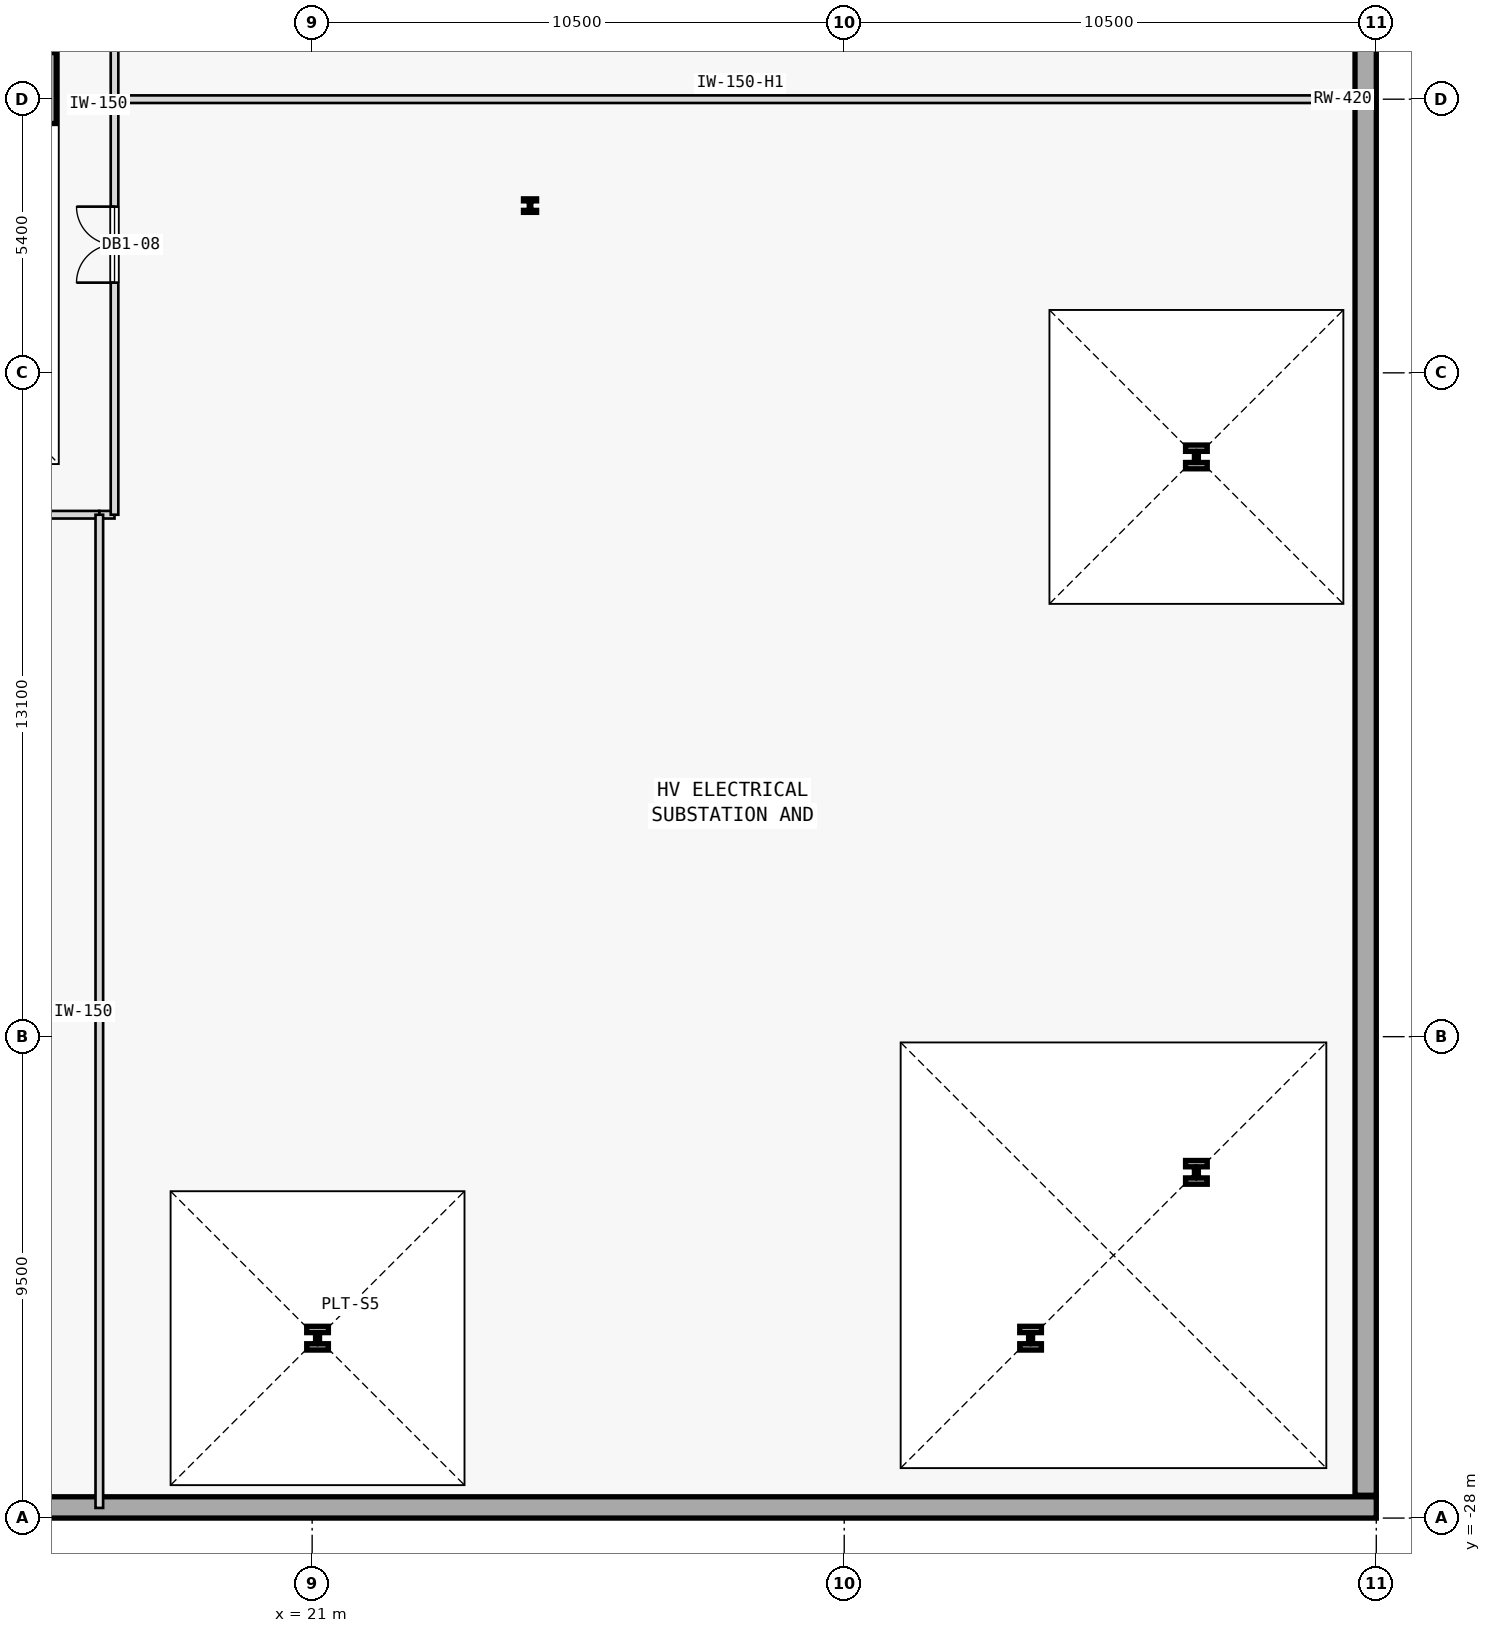
"""IFC4 building model, lengths in metres.
Left out: names, types, materials, properties, quantities, classifications, styles, units other than length and angle.
Written with IfcOpenShell. Run it as: python <this file> out.ifc"""

import sys

from ifc_helpers import new_model, si_unit, direction, frame, frame_2d, origin, origin_2d, place, context, subcontext, project, spatial, rectangle, i_section, extrude, element, fill, save


model = new_model("IFC4")
c1 = context("Model", 3, precision=1e-05, world=origin(), true_north=direction((0.0, 1.0)))
c2 = subcontext(c1, "Body", "Model", "MODEL_VIEW")
j1 = project(units=[si_unit("LENGTHUNIT", "METRE"), si_unit("PLANEANGLEUNIT", "RADIAN")], contexts=[c1])
p1 = place(None, origin())
s1 = spatial("IfcSite", under=j1, at=p1, CompositionType="ELEMENT")
p2 = place(p1, origin())
s2 = spatial("IfcBuilding", under=s1, at=p2, CompositionType="ELEMENT")
p3 = place(p2, frame((0.0, 0.0, -5.0)))
s3 = spatial("IfcBuildingStorey", under=s2, at=p3, CompositionType="ELEMENT", Elevation=-5.0)
p4 = place(p3, frame((-42.0, -27.79, 0.0), z_axis=(0.0, 0.0, 1.0), x_axis=(1.0, 0.0, 0.0)))
e1 = element("IfcWall", 1, at=p4, inside=s3, PredefinedType="SHEAR", context=c2, shape_type="SweptSolid", body=[
    extrude(rectangle(XDim=84.0, YDim=0.42, at=frame_2d((42.0, 0.0))), origin(), (0.0, 0.0, 1.0), 4.7),
])
p5 = place(p3, frame((41.79, -27.55, 0.0), z_axis=(0.0, 0.0, 1.0), x_axis=(0.0, 1.0, 0.0)))
e2 = element("IfcWall", 2, at=p5, inside=s3, PredefinedType="SHEAR", context=c2, shape_type="SweptSolid", body=[
    extrude(rectangle(XDim=55.1, YDim=0.42, at=frame_2d((27.55, 0.0))), origin(), (0.0, 0.0, 1.0), 4.7),
])
p6 = place(p3, frame((15.25, 0.22, 0.0), z_axis=(0.0, 0.0, 1.0), x_axis=(1.0, 0.0, 0.0)))
e3 = element("IfcColumn", 3, at=p6, inside=s3, PredefinedType="COLUMN", context=c2, shape_type="SweptSolid", body=[
    extrude(rectangle(XDim=1.4, YDim=1.4, at=origin_2d()), origin(), (0.0, 0.0, 1.0), 5.0),
])
for number, where, z_axis, x_axis in (
    (4, (21.107, -24.45, 0.0), (0.0, 0.0, 1.0), (1.0, 0.0, 0.0)),
    (5, (35.178, -24.45, 0.0), (0.0, 0.0, 1.0), (1.0, 0.0, 0.0)),
    (6, (38.45, -21.178, 0.0), (0.0, 0.0, 1.0), (1.0, 0.0, 0.0)),
    (7, (38.45, -7.059, 0.0), (0.0, 0.0, 1.0), (1.0, 0.0, 0.0)),
):
    element("IfcColumn", number, at=place(p3, frame(where, z_axis=z_axis, x_axis=x_axis)), inside=s3, PredefinedType="USERDEFINED", context=c2, shape_type="SweptSolid", body=[
        extrude(i_section(OverallWidth=0.428, OverallDepth=0.469, WebThickness=0.078, FlangeThickness=0.125, FilletRadius=0.015, at=origin_2d()), origin(), (0.0, 0.0, 1.0), 5.0),
    ])
p7 = place(p3, frame((25.3, -2.1, 0.0), z_axis=(0.0, 0.0, 1.0), x_axis=(1.0, 0.0, 0.0)))
e8 = element("IfcColumn", 8, at=p7, inside=s3, PredefinedType="COLUMN", context=c2, shape_type="SweptSolid", body=[
    extrude(i_section(OverallWidth=0.259, OverallDepth=0.267, WebThickness=0.013, FlangeThickness=0.021, FilletRadius=0.013, at=origin_2d()), origin(), (0.0, 0.0, 1.0), 5.0),
])
p8 = place(p3, frame((-17.1, -8.2, 0.0), z_axis=(0.0, 0.0, 1.0), x_axis=(1.0, 0.0, 0.0)))
e9 = element("IfcWall", 9, at=p8, inside=s3, PredefinedType="PARTITIONING", context=c2, shape_type="SweptSolid", body=[
    extrude(rectangle(XDim=33.9, YDim=0.15, at=frame_2d((16.95, 0.0))), origin(), (0.0, 0.0, 1.0), 4.7),
])
p9 = place(p8, frame((16.15, 0.0, 0.0)))
e10 = element("IfcOpeningElement", 10, at=p9, cuts=e9, PredefinedType="OPENING", context=c2, shape_type="SweptSolid", body=[
    extrude(rectangle(XDim=1.6, YDim=2.15, at=frame_2d((0.8, 1.075))), frame((0.0, 0.085, 0.0), z_axis=(0.0, -1.0, 0.0), x_axis=(1.0, 0.0, 0.0)), (0.0, 0.0, 1.0), 0.17),
])
p10 = place(p3, frame((16.8, -8.2, 0.0), z_axis=(0.0, 0.0, 1.0), x_axis=(1.0, 0.0, 0.0)))
e11 = element("IfcWall", 11, at=p10, inside=s3, PredefinedType="PARTITIONING", context=c2, shape_type="SweptSolid", body=[
    extrude(rectangle(XDim=0.3, YDim=0.15, at=frame_2d((0.15, 0.0))), origin(), (0.0, 0.0, 1.0), 4.7),
])
p11 = place(p3, frame((17.1, -8.2, 0.0), z_axis=(0.0, 0.0, 1.0), x_axis=(0.0, 1.0, 0.0)))
e12 = element("IfcWall", 12, at=p11, inside=s3, PredefinedType="PARTITIONING", context=c2, shape_type="SweptSolid", body=[
    extrude(rectangle(XDim=8.2, YDim=0.15, at=frame_2d((4.1, 0.0))), origin(), (0.0, 0.0, 1.0), 4.7),
])
p12 = place(p11, frame((4.58, 0.0, 0.0)))
e13 = element("IfcOpeningElement", 13, at=p12, cuts=e12, PredefinedType="OPENING", context=c2, shape_type="SweptSolid", body=[
    extrude(rectangle(XDim=1.5, YDim=2.15, at=frame_2d((0.75, 1.075))), frame((0.0, 0.085, 0.0), z_axis=(0.0, -1.0, 0.0), x_axis=(1.0, 0.0, 0.0)), (0.0, 0.0, 1.0), 0.17),
])
p13 = place(p3, frame((17.1, 0.0, 0.0), z_axis=(0.0, 0.0, 1.0), x_axis=(0.0, 1.0, 0.0)))
e14 = element("IfcWall", 14, at=p13, inside=s3, PredefinedType="PARTITIONING", context=c2, shape_type="SweptSolid", body=[
    extrude(rectangle(XDim=8.0, YDim=0.15, at=frame_2d((4.0, 0.0))), origin(), (0.0, 0.0, 1.0), 4.7),
])
p14 = place(p13, frame((2.225, 0.0, 0.0)))
e15 = element("IfcOpeningElement", 15, at=p14, cuts=e14, PredefinedType="OPENING", context=c2, shape_type="SweptSolid", body=[
    extrude(rectangle(XDim=1.15, YDim=2.15, at=frame_2d((0.575, 1.075))), frame((0.0, 0.085, 0.0), z_axis=(0.0, -1.0, 0.0), x_axis=(1.0, 0.0, 0.0)), (0.0, 0.0, 1.0), 0.17),
])
p15 = place(p3, frame((16.8, -27.8, 0.0), z_axis=(0.0, 0.0, 1.0), x_axis=(0.0, 1.0, 0.0)))
e16 = element("IfcWall", 16, at=p15, inside=s3, PredefinedType="PARTITIONING", context=c2, shape_type="SweptSolid", body=[
    extrude(rectangle(XDim=19.6, YDim=0.15, at=frame_2d((9.8, 0.0))), origin(), (0.0, 0.0, 1.0), 4.7),
])
p16 = place(p3, frame((17.1, 0.0, 0.0), z_axis=(0.0, 0.0, 1.0), x_axis=(1.0, 0.0, 0.0)))
e17 = element("IfcWall", 17, at=p16, inside=s3, PredefinedType="PARTITIONING", context=c2, shape_type="SweptSolid", body=[
    extrude(rectangle(XDim=24.7, YDim=0.15, at=frame_2d((12.35, 0.0))), origin(), (0.0, 0.0, 1.0), 4.25),
])
p17 = place(p12, origin())
e18 = element("IfcDoor", 18, at=p17, inside=s3, OperationType="DOUBLE_DOOR_SINGLE_SWING", PredefinedType="DOOR", context=c2, shape_type="SweptSolid", body=[
    extrude(rectangle(XDim=1.5, YDim=2.15, at=frame_2d((0.75, 1.075))), frame((0.0, 0.025, 0.0), z_axis=(0.0, -1.0, 0.0), x_axis=(1.0, 0.0, 0.0)), (0.0, 0.0, 1.0), 0.05),
])
fill(e13, e18)
save(model, sys.argv[1])
